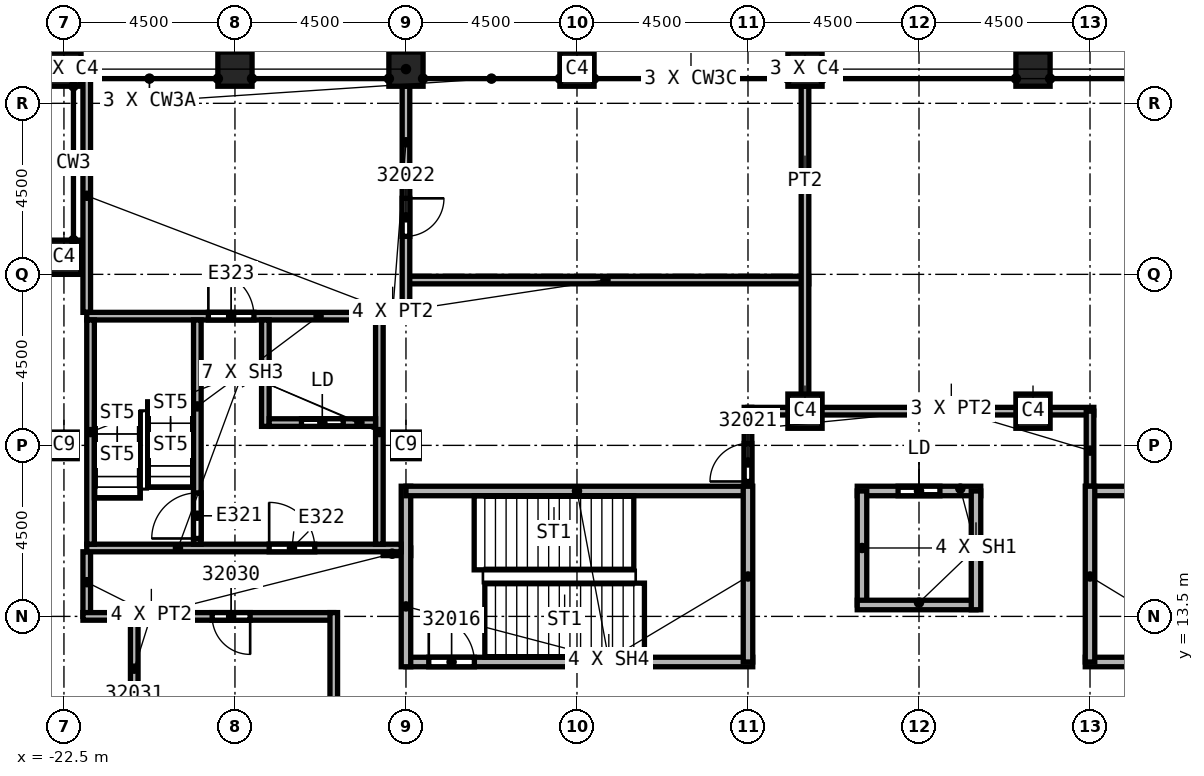
"""IFC4 building model, lengths in metres.
Left out: names, types, materials, properties, quantities, classifications, styles, units other than length and angle.
Written with IfcOpenShell. Run it as: python <this file> out.ifc"""

import sys

from ifc_helpers import new_model, si_unit, direction, frame, frame_2d, origin, origin_2d, place, context, subcontext, project, spatial, rectangle, extrude, element, fill, save


model = new_model("IFC4")
c1 = context("Model", 3, precision=1e-05, world=origin(), true_north=direction((0.0, 1.0)))
c2 = subcontext(c1, "Body", "Model", "MODEL_VIEW")
j1 = project(units=[si_unit("LENGTHUNIT", "METRE"), si_unit("PLANEANGLEUNIT", "RADIAN")], contexts=[c1])
p1 = place(None, origin())
s1 = spatial("IfcSite", under=j1, at=p1, CompositionType="ELEMENT")
p2 = place(p1, origin())
s2 = spatial("IfcBuilding", under=s1, at=p2, CompositionType="ELEMENT")
p3 = place(p2, frame((0.0, 0.0, 356.0)))
s3 = spatial("IfcBuildingStorey", under=s2, at=p3, CompositionType="ELEMENT", Elevation=356.0)
for number, where, z_axis, x_axis in (
    (1, (-13.5, 18.0, 0.0), (0.0, 0.0, 1.0), (1.0, 0.0, 0.0)),
    (2, (-22.5, 18.0, 0.0), (0.0, 0.0, 1.0), (1.0, 0.0, 0.0)),
):
    element("IfcColumn", number, at=place(p3, frame(where, z_axis=z_axis, x_axis=x_axis)), inside=s3, PredefinedType="COLUMN", context=c2, shape_type="SweptSolid", body=[
        extrude(rectangle(XDim=0.7, YDim=0.7, at=origin_2d()), origin(), (0.0, 0.0, 1.0), 4.6),
    ])
for number, where, z_axis, x_axis in (
    (3, (3.0, 27.9, 0.0), (0.0, 0.0, 1.0), (1.0, 0.0, 0.0)),
    (4, (-3.0, 27.9, 0.0), (0.0, 0.0, 1.0), (1.0, 0.0, 0.0)),
    (5, (-9.0, 27.9, 0.0), (0.0, 0.0, 1.0), (1.0, 0.0, 0.0)),
    (6, (-13.5, 27.9, 0.0), (0.0, 0.0, 1.0), (1.0, 0.0, 0.0)),
    (7, (-18.0, 27.9, 0.0), (0.0, 0.0, 1.0), (1.0, 0.0, 0.0)),
    (8, (-22.5, 27.9, 0.0), (0.0, 0.0, 1.0), (1.0, 0.0, 0.0)),
    (9, (3.0, 18.9, 0.0), (0.0, 0.0, 1.0), (1.0, 0.0, 0.0)),
    (10, (-3.0, 18.9, 0.0), (0.0, 0.0, 1.0), (1.0, 0.0, 0.0)),
    (11, (-22.5, 22.95, 0.0), (0.0, 0.0, 1.0), (1.0, 0.0, 0.0)),
):
    element("IfcColumn", number, at=place(p3, frame(where, z_axis=z_axis, x_axis=x_axis)), inside=s3, PredefinedType="COLUMN", context=c2, shape_type="SweptSolid", body=[
        extrude(rectangle(XDim=0.9, YDim=0.9, at=origin_2d()), origin(), (0.0, 0.0, 1.0), 4.6),
    ])
p4 = place(p3, frame((-21.9, 13.5, 0.0), z_axis=(0.0, 0.0, 1.0), x_axis=(0.0, 1.0, 0.0)))
e12 = element("IfcWall", 12, at=p4, inside=s3, PredefinedType="PARTITIONING", context=c2, shape_type="SweptSolid", body=[
    extrude(rectangle(XDim=1.7, YDim=0.2, at=frame_2d((0.85, 0.0))), origin(), (0.0, 0.0, 1.0), 4.15),
])
p5 = place(p3, frame((-21.9, 21.5, 0.0), z_axis=(0.0, 0.0, 1.0), x_axis=(0.0, 1.0, 0.0)))
e13 = element("IfcWall", 13, at=p5, inside=s3, PredefinedType="PARTITIONING", context=c2, shape_type="SweptSolid", body=[
    extrude(rectangle(XDim=6.136, YDim=0.2, at=frame_2d((3.068, 0.0))), origin(), (0.0, 0.0, 1.0), 4.15),
])
p6 = place(p3, frame((-20.65, 9.0, 0.0), z_axis=(0.0, 0.0, 1.0), x_axis=(0.0, 1.0, 0.0)))
e14 = element("IfcWall", 14, at=p6, inside=s3, PredefinedType="PARTITIONING", context=c2, shape_type="SweptSolid", body=[
    extrude(rectangle(XDim=4.5, YDim=0.2, at=frame_2d((2.25, 0.0))), origin(), (0.0, 0.0, 1.0), 4.15),
])
p7 = place(p6, frame((0.85, 0.0, 0.0)))
e15 = element("IfcOpeningElement", 15, at=p7, cuts=e14, PredefinedType="OPENING", context=c2, shape_type="SweptSolid", body=[
    extrude(rectangle(XDim=1.0, YDim=2.1, at=frame_2d((0.5, 1.05))), frame((0.0, 0.1, 0.0), z_axis=(0.0, -1.0, 0.0), x_axis=(1.0, 0.0, 0.0)), (0.0, 0.0, 1.0), 0.2),
])
p8 = place(p3, frame((-15.4, 13.5, 0.0), z_axis=(0.0, 0.0, 1.0), x_axis=(-1.0, 0.0, 0.0)))
e16 = element("IfcWall", 16, at=p8, inside=s3, PredefinedType="PARTITIONING", context=c2, shape_type="SweptSolid", body=[
    extrude(rectangle(XDim=6.6, YDim=0.2, at=frame_2d((3.3, 0.0))), origin(), (0.0, 0.0, 1.0), 4.15),
])
p9 = place(p8, frame((2.2, 0.0, 0.0)))
e17 = element("IfcOpeningElement", 17, at=p9, cuts=e16, PredefinedType="OPENING", context=c2, shape_type="SweptSolid", body=[
    extrude(rectangle(XDim=1.0, YDim=2.1, at=frame_2d((0.5, 1.05))), frame((0.0, 0.1, 0.0), z_axis=(0.0, -1.0, 0.0), x_axis=(1.0, 0.0, 0.0)), (0.0, 0.0, 1.0), 0.2),
])
p10 = place(p3, frame((-15.4, -27.636, 0.0), z_axis=(0.0, 0.0, 1.0), x_axis=(0.0, 1.0, 0.0)))
e18 = element("IfcWall", 18, at=p10, inside=s3, PredefinedType="PARTITIONING", context=c2, shape_type="SweptSolid", body=[
    extrude(rectangle(XDim=41.236, YDim=0.2, at=frame_2d((20.618, 0.0))), origin(), (0.0, 0.0, 1.0), 4.15),
])
p11 = place(p10, frame((30.936, 0.0, 0.0)))
e19 = element("IfcOpeningElement", 19, at=p11, cuts=e18, PredefinedType="OPENING", context=c2, shape_type="SweptSolid", body=[
    extrude(rectangle(XDim=1.0, YDim=2.1, at=frame_2d((0.5, 1.05))), frame((0.0, 0.1, 0.0), z_axis=(0.0, -1.0, 0.0), x_axis=(1.0, 0.0, 0.0)), (0.0, 0.0, 1.0), 0.2),
])
p12 = place(p10, frame((34.836, 0.0, 0.0)))
e20 = element("IfcOpeningElement", 20, at=p12, cuts=e18, PredefinedType="OPENING", context=c2, shape_type="SweptSolid", body=[
    extrude(rectangle(XDim=1.0, YDim=2.1, at=frame_2d((0.5, 1.05))), frame((0.0, 0.1, 0.0), z_axis=(0.0, -1.0, 0.0), x_axis=(1.0, 0.0, 0.0)), (0.0, 0.0, 1.0), 0.2),
])
p13 = place(p10, frame((8.2, 0.0, 0.0)))
e21 = element("IfcOpeningElement", 21, at=p13, cuts=e18, PredefinedType="OPENING", context=c2, shape_type="SweptSolid", body=[
    extrude(rectangle(XDim=1.0, YDim=2.1, at=frame_2d((0.5, 1.05))), frame((0.0, 0.1, 0.0), z_axis=(0.0, -1.0, 0.0), x_axis=(1.0, 0.0, 0.0)), (0.0, 0.0, 1.0), 0.2),
])
p14 = place(p10, frame((22.986, 0.0, 0.0)))
e22 = element("IfcOpeningElement", 22, at=p14, cuts=e18, PredefinedType="OPENING", context=c2, shape_type="SweptSolid", body=[
    extrude(rectangle(XDim=1.0, YDim=2.1, at=frame_2d((0.5, 1.05))), frame((0.0, 0.1, 0.0), z_axis=(0.0, -1.0, 0.0), x_axis=(1.0, 0.0, 0.0)), (0.0, 0.0, 1.0), 0.2),
])
p15 = place(p10, frame((26.361, 0.0, 0.0)))
e23 = element("IfcOpeningElement", 23, at=p15, cuts=e18, PredefinedType="OPENING", context=c2, shape_type="SweptSolid", body=[
    extrude(rectangle(XDim=1.0, YDim=2.1, at=frame_2d((0.5, 1.05))), frame((0.0, 0.1, 0.0), z_axis=(0.0, -1.0, 0.0), x_axis=(1.0, 0.0, 0.0)), (0.0, 0.0, 1.0), 0.2),
])
p16 = place(p3, frame((-14.1, 15.2, 0.0), z_axis=(0.0, 0.0, 1.0), x_axis=(1.0, 0.0, 0.0)))
e24 = element("IfcWall", 24, at=p16, inside=s3, PredefinedType="PARTITIONING", context=c2, shape_type="SweptSolid", body=[
    extrude(rectangle(XDim=0.725, YDim=0.2, at=frame_2d((0.363, 0.0))), origin(), (0.0, 0.0, 1.0), 4.15),
])
p17 = place(p3, frame((-13.5, 21.5, 0.0), z_axis=(0.0, 0.0, 1.0), x_axis=(-1.0, 0.0, 0.0)))
e25 = element("IfcWall", 25, at=p17, inside=s3, PredefinedType="PARTITIONING", context=c2, shape_type="SweptSolid", body=[
    extrude(rectangle(XDim=0.6, YDim=0.2, at=frame_2d((0.3, 0.0))), origin(), (0.0, 0.0, 1.0), 4.15),
])
p18 = place(p3, frame((-13.5, 22.35, 0.0), z_axis=(0.0, 0.0, 1.0), x_axis=(1.0, 0.0, 0.0)))
e26 = element("IfcWall", 26, at=p18, inside=s3, PredefinedType="PARTITIONING", context=c2, shape_type="SweptSolid", body=[
    extrude(rectangle(XDim=10.6, YDim=0.2, at=frame_2d((5.3, 0.0))), origin(), (0.0, 0.0, 1.0), 4.15),
])
p19 = place(p3, frame((-13.5, 27.45, 0.0), z_axis=(0.0, 0.0, 1.0), x_axis=(0.0, -1.0, 0.0)))
e27 = element("IfcWall", 27, at=p19, inside=s3, PredefinedType="PARTITIONING", context=c2, shape_type="SweptSolid", body=[
    extrude(rectangle(XDim=6.05, YDim=0.2, at=frame_2d((3.025, 0.0))), origin(), (0.0, 0.0, 1.0), 4.15),
])
p20 = place(p19, frame((2.95, 0.0, 0.0)))
e28 = element("IfcOpeningElement", 28, at=p20, cuts=e27, PredefinedType="OPENING", context=c2, shape_type="SweptSolid", body=[
    extrude(rectangle(XDim=1.0, YDim=2.1, at=frame_2d((0.5, 1.05))), frame((0.0, 0.1, 0.0), z_axis=(0.0, -1.0, 0.0), x_axis=(1.0, 0.0, 0.0)), (0.0, 0.0, 1.0), 0.2),
])
p21 = place(p3, frame((-4.5, 16.8, 0.0), z_axis=(0.0, 0.0, 1.0), x_axis=(0.0, 1.0, 0.0)))
e29 = element("IfcWall", 29, at=p21, inside=s3, PredefinedType="PARTITIONING", context=c2, shape_type="SweptSolid", body=[
    extrude(rectangle(XDim=2.2, YDim=0.2, at=frame_2d((1.1, 0.0))), origin(), (0.0, 0.0, 1.0), 4.15),
])
p22 = place(p21, frame((0.25, 0.0, 0.0)))
e30 = element("IfcOpeningElement", 30, at=p22, cuts=e29, PredefinedType="OPENING", context=c2, shape_type="SweptSolid", body=[
    extrude(rectangle(XDim=1.0, YDim=2.1, at=frame_2d((0.5, 1.05))), frame((0.0, 0.1, 0.0), z_axis=(0.0, -1.0, 0.0), x_axis=(1.0, 0.0, 0.0)), (0.0, 0.0, 1.0), 0.2),
])
p23 = place(p3, frame((-4.5, 18.9, 0.0), z_axis=(0.0, 0.0, 1.0), x_axis=(1.0, 0.0, 0.0)))
e31 = element("IfcWall", 31, at=p23, inside=s3, PredefinedType="PARTITIONING", context=c2, shape_type="SweptSolid", body=[
    extrude(rectangle(XDim=9.1, YDim=0.2, at=frame_2d((4.55, 0.0))), origin(), (0.0, 0.0, 1.0), 4.15),
])
p24 = place(p3, frame((-3.0, 27.45, 0.0), z_axis=(0.0, 0.0, 1.0), x_axis=(0.0, -1.0, 0.0)))
e32 = element("IfcWall", 32, at=p24, inside=s3, PredefinedType="PARTITIONING", context=c2, shape_type="SweptSolid", body=[
    extrude(rectangle(XDim=8.55, YDim=0.2, at=frame_2d((4.275, 0.0))), origin(), (0.0, 0.0, 1.0), 4.15),
])
p25 = place(p3, frame((4.5, 18.9, 0.0), z_axis=(0.0, 0.0, 1.0), x_axis=(0.0, -1.0, 0.0)))
e33 = element("IfcWall", 33, at=p25, inside=s3, PredefinedType="PARTITIONING", context=c2, shape_type="SweptSolid", body=[
    extrude(rectangle(XDim=2.1, YDim=0.2, at=frame_2d((1.05, 0.0))), origin(), (0.0, 0.0, 1.0), 4.15),
])
p26 = place(p3, frame((-1.625, 16.8, 0.0), z_axis=(0.0, 0.0, 1.0), x_axis=(1.0, 0.0, 0.0)))
e34 = element("IfcWall", 34, at=p26, inside=s3, PredefinedType="SOLIDWALL", context=c2, shape_type="SweptSolid", body=[
    extrude(rectangle(XDim=3.25, YDim=0.25, at=frame_2d((1.625, 0.0))), origin(), (0.0, 0.0, 1.0), 4.15),
])
p27 = place(p26, frame((1.075, 0.0, 0.0)))
e35 = element("IfcOpeningElement", 35, at=p27, cuts=e34, PredefinedType="OPENING", context=c2, shape_type="SweptSolid", body=[
    extrude(rectangle(XDim=1.1, YDim=2.1, at=frame_2d((0.55, 1.05))), frame((0.0, 0.125, 0.0), z_axis=(0.0, -1.0, 0.0), x_axis=(1.0, 0.0, 0.0)), (0.0, 0.0, 1.0), 0.25),
])
p28 = place(p3, frame((-1.5, 13.8, 0.0), z_axis=(0.0, 0.0, 1.0), x_axis=(0.0, 1.0, 0.0)))
e36 = element("IfcWall", 36, at=p28, inside=s3, PredefinedType="SOLIDWALL", context=c2, shape_type="SweptSolid", body=[
    extrude(rectangle(XDim=3.0, YDim=0.25, at=frame_2d((1.5, 0.0))), origin(), (0.0, 0.0, 1.0), 4.15),
])
for number, where, z_axis, x_axis in (
    (37, (1.5, 13.8, 0.0), (0.0, 0.0, 1.0), (-1.0, 0.0, 0.0)),
    (38, (1.5, 16.8, 0.0), (0.0, 0.0, 1.0), (0.0, -1.0, 0.0)),
):
    element("IfcWall", number, at=place(p3, frame(where, z_axis=z_axis, x_axis=x_axis)), inside=s3, PredefinedType="SOLIDWALL", context=c2, shape_type="SweptSolid", body=[
        extrude(rectangle(XDim=3.125, YDim=0.25, at=frame_2d((1.562, 0.0))), origin(), (0.0, 0.0, 1.0), 4.15),
    ])
p29 = place(p3, frame((-13.5, 12.3, 0.0), z_axis=(0.0, 0.0, 1.0), x_axis=(1.0, 0.0, 0.0)))
e39 = element("IfcWall", 39, at=p29, inside=s3, PredefinedType="SOLIDWALL", context=c2, shape_type="SweptSolid", body=[
    extrude(rectangle(XDim=9.125, YDim=0.25, at=frame_2d((4.562, 0.0))), origin(), (0.0, 0.0, 1.0), 4.15),
])
p30 = place(p29, frame((0.6, 0.0, 0.0)))
e40 = element("IfcOpeningElement", 40, at=p30, cuts=e39, PredefinedType="OPENING", context=c2, shape_type="SweptSolid", body=[
    extrude(rectangle(XDim=1.2, YDim=2.1, at=frame_2d((0.6, 1.05))), frame((0.0, 0.125, 0.0), z_axis=(0.0, -1.0, 0.0), x_axis=(1.0, 0.0, 0.0)), (0.0, 0.0, 1.0), 0.25),
])
p31 = place(p3, frame((-13.5, 12.175, 0.0), z_axis=(0.0, 0.0, 1.0), x_axis=(0.0, 1.0, 0.0)))
e41 = element("IfcWall", 41, at=p31, inside=s3, PredefinedType="SOLIDWALL", context=c2, shape_type="SweptSolid", body=[
    extrude(rectangle(XDim=4.75, YDim=0.25, at=frame_2d((2.375, 0.0))), origin(), (0.0, 0.0, 1.0), 4.15),
])
p32 = place(p3, frame((-13.5, 16.8, 0.0), z_axis=(0.0, 0.0, 1.0), x_axis=(1.0, 0.0, 0.0)))
e42 = element("IfcWall", 42, at=p32, inside=s3, PredefinedType="SOLIDWALL", context=c2, shape_type="SweptSolid", body=[
    extrude(rectangle(XDim=9.1, YDim=0.25, at=frame_2d((4.55, 0.0))), origin(), (0.0, 0.0, 1.0), 4.15),
])
p33 = place(p3, frame((-4.5, 16.925, 0.0), z_axis=(0.0, 0.0, 1.0), x_axis=(0.0, -1.0, 0.0)))
e43 = element("IfcWall", 43, at=p33, inside=s3, PredefinedType="SOLIDWALL", context=c2, shape_type="SweptSolid", body=[
    extrude(rectangle(XDim=4.625, YDim=0.25, at=frame_2d((2.312, 0.0))), origin(), (0.0, 0.0, 1.0), 4.15),
])
p34 = place(p3, frame((4.375, 12.3, 0.0), z_axis=(0.0, 0.0, 1.0), x_axis=(1.0, 0.0, 0.0)))
e44 = element("IfcWall", 44, at=p34, inside=s3, PredefinedType="SOLIDWALL", context=c2, shape_type="SweptSolid", body=[
    extrude(rectangle(XDim=9.125, YDim=0.25, at=frame_2d((4.562, 0.0))), origin(), (0.0, 0.0, 1.0), 4.15),
])
p35 = place(p34, frame((7.2, 0.0, 0.0)))
e45 = element("IfcOpeningElement", 45, at=p35, cuts=e44, PredefinedType="OPENING", context=c2, shape_type="SweptSolid", body=[
    extrude(rectangle(XDim=1.2, YDim=2.1, at=frame_2d((0.6, 1.05))), frame((0.0, 0.125, 0.0), z_axis=(0.0, -1.0, 0.0), x_axis=(1.0, 0.0, 0.0)), (0.0, 0.0, 1.0), 0.25),
])
p36 = place(p3, frame((4.4, 16.8, 0.0), z_axis=(0.0, 0.0, 1.0), x_axis=(1.0, 0.0, 0.0)))
e46 = element("IfcWall", 46, at=p36, inside=s3, PredefinedType="SOLIDWALL", context=c2, shape_type="SweptSolid", body=[
    extrude(rectangle(XDim=9.1, YDim=0.25, at=frame_2d((4.55, 0.0))), origin(), (0.0, 0.0, 1.0), 4.15),
])
p37 = place(p3, frame((4.5, 12.3, 0.0), z_axis=(0.0, 0.0, 1.0), x_axis=(0.0, 1.0, 0.0)))
e47 = element("IfcWall", 47, at=p37, inside=s3, PredefinedType="SOLIDWALL", context=c2, shape_type="SweptSolid", body=[
    extrude(rectangle(XDim=4.625, YDim=0.25, at=frame_2d((2.312, 0.0))), origin(), (0.0, 0.0, 1.0), 4.15),
])
p38 = place(p3, frame((-21.9, 15.3, 0.0), z_axis=(0.0, 0.0, 1.0), x_axis=(1.0, 0.0, 0.0)))
e48 = element("IfcWall", 48, at=p38, inside=s3, PredefinedType="SOLIDWALL", context=c2, shape_type="SweptSolid", body=[
    extrude(rectangle(XDim=8.275, YDim=0.2, at=frame_2d((4.137, 0.0))), origin(), (0.0, 0.0, 1.0), 4.15),
])
p39 = place(p38, frame((4.8, 0.0, 0.0)))
e49 = element("IfcOpeningElement", 49, at=p39, cuts=e48, PredefinedType="OPENING", context=c2, shape_type="SweptSolid", body=[
    extrude(rectangle(XDim=1.2, YDim=2.1, at=frame_2d((0.6, 1.05))), frame((0.0, 0.1, 0.0), z_axis=(0.0, -1.0, 0.0), x_axis=(1.0, 0.0, 0.0)), (0.0, 0.0, 1.0), 0.2),
])
p40 = place(p3, frame((-21.9, 21.4, 0.0), z_axis=(0.0, 0.0, 1.0), x_axis=(1.0, 0.0, 0.0)))
e50 = element("IfcWall", 50, at=p40, inside=s3, PredefinedType="SOLIDWALL", context=c2, shape_type="SweptSolid", body=[
    extrude(rectangle(XDim=7.8, YDim=0.2, at=frame_2d((3.9, 0.0))), origin(), (0.0, 0.0, 1.0), 4.15),
])
p41 = place(p40, frame((3.2, 0.0, 0.0)))
e51 = element("IfcOpeningElement", 51, at=p41, cuts=e50, PredefinedType="OPENING", context=c2, shape_type="SweptSolid", body=[
    extrude(rectangle(XDim=1.2, YDim=2.1, at=frame_2d((0.6, 1.05))), frame((0.0, 0.1, 0.0), z_axis=(0.0, -1.0, 0.0), x_axis=(1.0, 0.0, 0.0)), (0.0, 0.0, 1.0), 0.2),
])
for number, where, z_axis, x_axis in (
    (52, (-21.8, 15.4, 0.0), (0.0, 0.0, 1.0), (0.0, 1.0, 0.0)),
    (53, (-14.2, 15.4, 0.0), (0.0, 0.0, 1.0), (0.0, 1.0, 0.0)),
):
    element("IfcWall", number, at=place(p3, frame(where, z_axis=z_axis, x_axis=x_axis)), inside=s3, PredefinedType="SOLIDWALL", context=c2, shape_type="SweptSolid", body=[
        extrude(rectangle(XDim=5.9, YDim=0.2, at=frame_2d((2.95, 0.0))), origin(), (0.0, 0.0, 1.0), 4.15),
    ])
p42 = place(p3, frame((-18.99, 15.4, 0.0), z_axis=(0.0, 0.0, 1.0), x_axis=(0.0, 1.0, 0.0)))
e54 = element("IfcWall", 54, at=p42, inside=s3, PredefinedType="SOLIDWALL", context=c2, shape_type="SweptSolid", body=[
    extrude(rectangle(XDim=5.9, YDim=0.2, at=frame_2d((2.95, 0.0))), origin(), (0.0, 0.0, 1.0), 4.15),
])
p43 = place(p42, frame((0.15, 0.0, 0.0)))
e55 = element("IfcOpeningElement", 55, at=p43, cuts=e54, PredefinedType="OPENING", context=c2, shape_type="SweptSolid", body=[
    extrude(rectangle(XDim=1.2, YDim=2.1, at=frame_2d((0.6, 1.05))), frame((0.0, 0.1, 0.0), z_axis=(0.0, -1.0, 0.0), x_axis=(1.0, 0.0, 0.0)), (0.0, 0.0, 1.0), 0.2),
])
p44 = place(p3, frame((-17.2, 18.5, 0.0), z_axis=(0.0, 0.0, 1.0), x_axis=(0.0, 1.0, 0.0)))
e56 = element("IfcWall", 56, at=p44, inside=s3, PredefinedType="SOLIDWALL", context=c2, shape_type="SweptSolid", body=[
    extrude(rectangle(XDim=2.8, YDim=0.2, at=frame_2d((1.4, 0.0))), origin(), (0.0, 0.0, 1.0), 4.15),
])
p45 = place(p3, frame((-17.1, 18.6, 0.0), z_axis=(0.0, 0.0, 1.0), x_axis=(1.0, 0.0, 0.0)))
e57 = element("IfcWall", 57, at=p45, inside=s3, PredefinedType="SOLIDWALL", context=c2, shape_type="SweptSolid", body=[
    extrude(rectangle(XDim=2.8, YDim=0.2, at=frame_2d((1.4, 0.0))), origin(), (0.0, 0.0, 1.0), 4.15),
])
p46 = place(p45, frame((0.85, 0.0, 0.0)))
e58 = element("IfcOpeningElement", 58, at=p46, cuts=e57, PredefinedType="OPENING", context=c2, shape_type="SweptSolid", body=[
    extrude(rectangle(XDim=1.1, YDim=2.1, at=frame_2d((0.55, 1.05))), frame((0.0, 0.1, 0.0), z_axis=(0.0, -1.0, 0.0), x_axis=(1.0, 0.0, 0.0)), (0.0, 0.0, 1.0), 0.2),
])
p47 = place(p30, origin())
e59 = element("IfcDoor", 59, at=p47, inside=s3, OperationType="SINGLE_SWING_LEFT", PredefinedType="DOOR", context=c2, shape_type="SweptSolid", body=[
    extrude(rectangle(XDim=1.2, YDim=2.1, at=frame_2d((0.6, 1.05))), frame((0.0, 0.025, 0.0), z_axis=(0.0, -1.0, 0.0), x_axis=(1.0, 0.0, 0.0)), (0.0, 0.0, 1.0), 0.05),
])
fill(e40, e59)
p48 = place(p22, origin())
e60 = element("IfcDoor", 60, at=p48, inside=s3, OperationType="SINGLE_SWING_RIGHT", PredefinedType="DOOR", context=c2, shape_type="SweptSolid", body=[
    extrude(rectangle(XDim=1.0, YDim=2.1, at=frame_2d((0.5, 1.05))), frame((0.0, 0.025, 0.0), z_axis=(0.0, -1.0, 0.0), x_axis=(1.0, 0.0, 0.0)), (0.0, 0.0, 1.0), 0.05),
])
fill(e30, e60)
p49 = place(p20, origin())
e61 = element("IfcDoor", 61, at=p49, inside=s3, OperationType="SINGLE_SWING_LEFT", PredefinedType="DOOR", context=c2, shape_type="SweptSolid", body=[
    extrude(rectangle(XDim=1.0, YDim=2.1, at=frame_2d((0.5, 1.05))), frame((0.0, 0.025, 0.0), z_axis=(0.0, -1.0, 0.0), x_axis=(1.0, 0.0, 0.0)), (0.0, 0.0, 1.0), 0.05),
])
fill(e28, e61)
p50 = place(p9, origin())
e62 = element("IfcDoor", 62, at=p50, inside=s3, OperationType="SINGLE_SWING_LEFT", PredefinedType="DOOR", context=c2, shape_type="SweptSolid", body=[
    extrude(rectangle(XDim=1.0, YDim=2.1, at=frame_2d((0.5, 1.05))), frame((0.0, 0.025, 0.0), z_axis=(0.0, -1.0, 0.0), x_axis=(1.0, 0.0, 0.0)), (0.0, 0.0, 1.0), 0.05),
])
fill(e17, e62)
p51 = place(p27, origin())
e63 = element("IfcDoor", 63, at=p51, inside=s3, OperationType="SLIDING_TO_LEFT", PredefinedType="DOOR", context=c2, shape_type="SweptSolid", body=[
    extrude(rectangle(XDim=1.1, YDim=2.1, at=frame_2d((0.55, 1.05))), frame((0.0, 0.025, 0.0), z_axis=(0.0, -1.0, 0.0), x_axis=(1.0, 0.0, 0.0)), (0.0, 0.0, 1.0), 0.05),
])
fill(e35, e63)
p52 = place(p43, origin())
e64 = element("IfcDoor", 64, at=p52, inside=s3, OperationType="SINGLE_SWING_LEFT", PredefinedType="DOOR", context=c2, shape_type="SweptSolid", body=[
    extrude(rectangle(XDim=1.2, YDim=2.1, at=frame_2d((0.6, 1.05))), frame((0.0, 0.025, 0.0), z_axis=(0.0, -1.0, 0.0), x_axis=(1.0, 0.0, 0.0)), (0.0, 0.0, 1.0), 0.05),
])
fill(e55, e64)
p53 = place(p46, origin())
e65 = element("IfcDoor", 65, at=p53, inside=s3, OperationType="SLIDING_TO_LEFT", PredefinedType="DOOR", context=c2, shape_type="SweptSolid", body=[
    extrude(rectangle(XDim=1.1, YDim=2.1, at=frame_2d((0.55, 1.05))), frame((0.0, 0.025, 0.0), z_axis=(0.0, -1.0, 0.0), x_axis=(1.0, 0.0, 0.0)), (0.0, 0.0, 1.0), 0.05),
])
fill(e58, e65)
p54 = place(p39, origin())
e66 = element("IfcDoor", 66, at=p54, inside=s3, OperationType="SINGLE_SWING_RIGHT", PredefinedType="DOOR", context=c2, shape_type="SweptSolid", body=[
    extrude(rectangle(XDim=1.2, YDim=2.1, at=frame_2d((0.6, 1.05))), frame((0.0, 0.025, 0.0), z_axis=(0.0, -1.0, 0.0), x_axis=(1.0, 0.0, 0.0)), (0.0, 0.0, 1.0), 0.05),
])
fill(e49, e66)
p55 = place(p41, origin())
e67 = element("IfcDoor", 67, at=p55, inside=s3, OperationType="SINGLE_SWING_LEFT", PredefinedType="DOOR", context=c2, shape_type="SweptSolid", body=[
    extrude(rectangle(XDim=1.2, YDim=2.1, at=frame_2d((0.6, 1.05))), frame((0.0, 0.025, 0.0), z_axis=(0.0, -1.0, 0.0), x_axis=(1.0, 0.0, 0.0)), (0.0, 0.0, 1.0), 0.05),
])
fill(e51, e67)
save(model, sys.argv[1])
